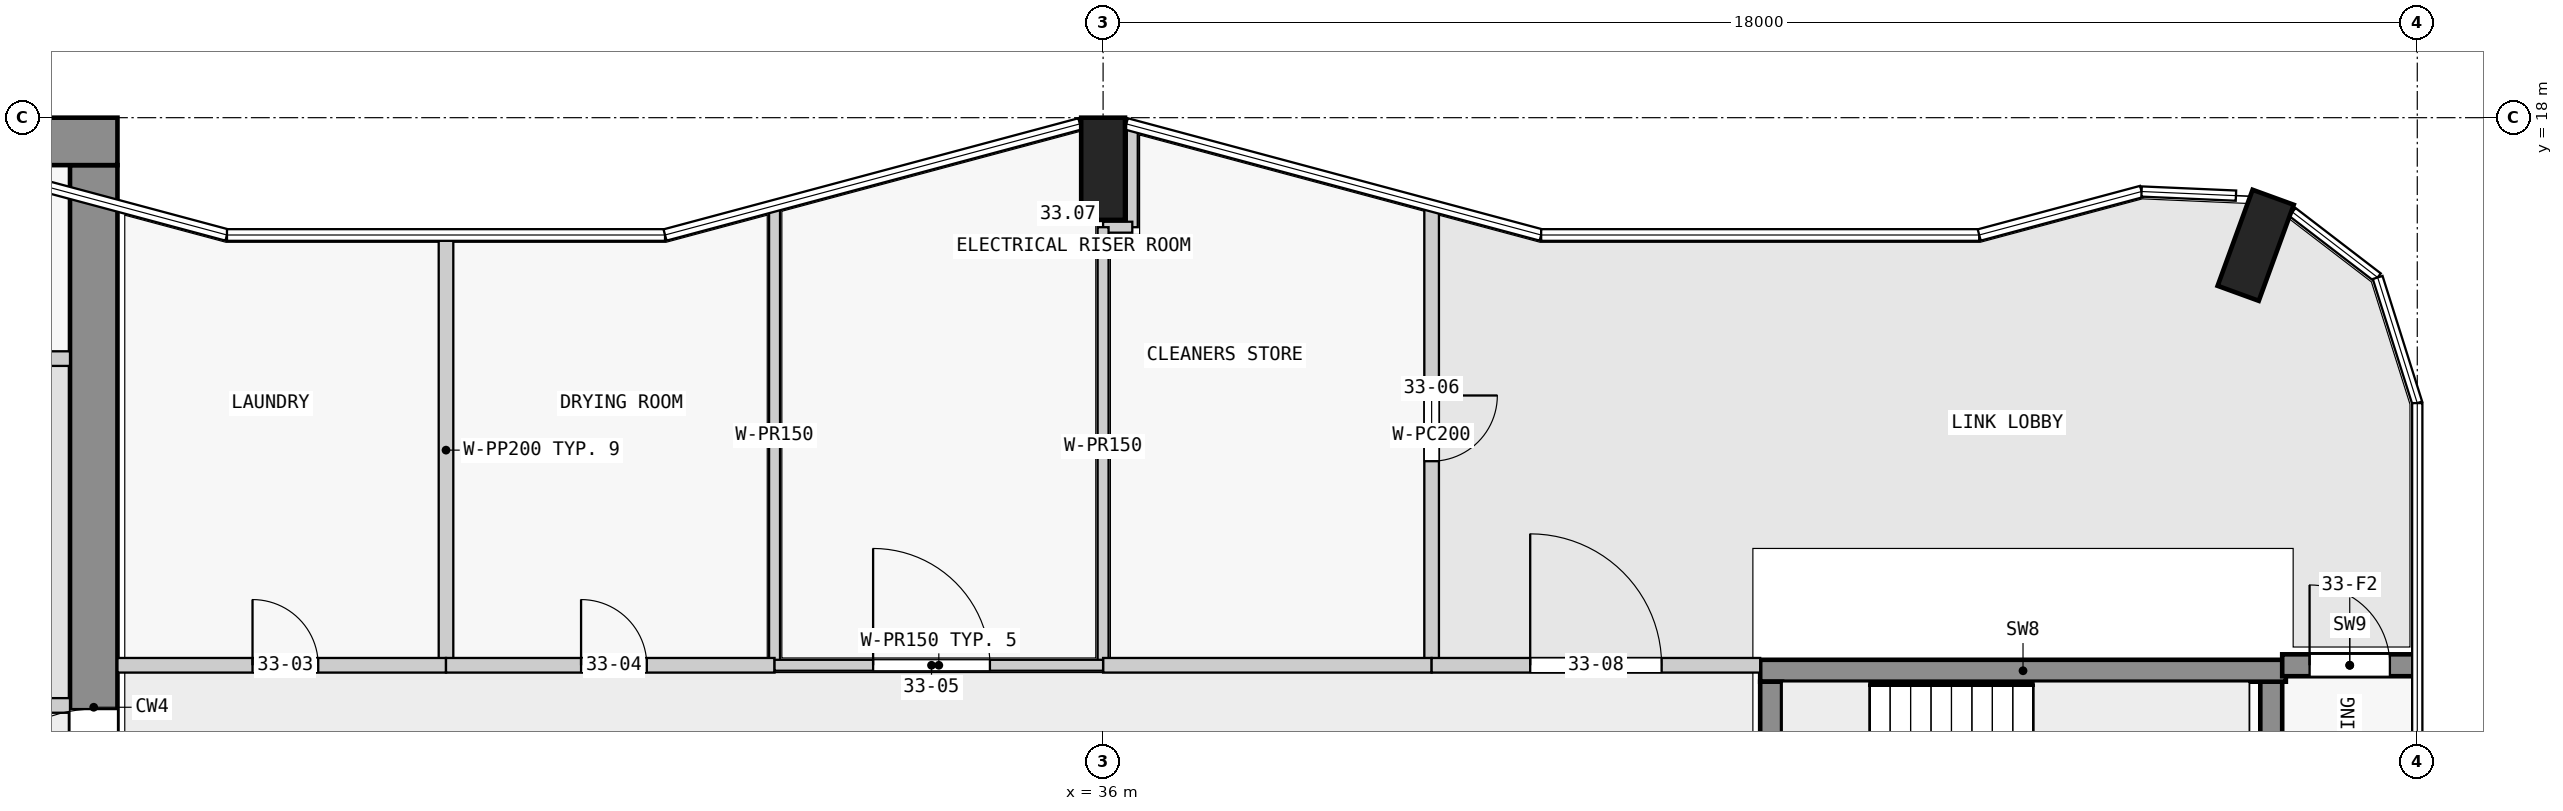
"""IFC4 building model, lengths in metres.
Left out: names, types, materials, properties, quantities, classifications, styles, units other than length and angle.
Written with IfcOpenShell. Run it as: python <this file> out.ifc"""

import sys

from ifc_helpers import new_model, si_unit, direction, frame, frame_2d, origin, origin_2d, place, context, subcontext, project, spatial, rectangle, extrude, element, fill, save


model = new_model("IFC4")
c1 = context("Model", 3, precision=1e-05, world=origin(), true_north=direction((0.0, 1.0)))
c2 = subcontext(c1, "Body", "Model", "MODEL_VIEW")
j1 = project(units=[si_unit("LENGTHUNIT", "METRE"), si_unit("PLANEANGLEUNIT", "RADIAN")], contexts=[c1])
p1 = place(None, origin())
s1 = spatial("IfcSite", under=j1, at=p1, CompositionType="ELEMENT")
p2 = place(p1, origin())
s2 = spatial("IfcBuilding", under=s1, at=p2, CompositionType="ELEMENT")
p3 = place(p2, frame((0.0, 0.0, 128.6)))
s3 = spatial("IfcBuildingStorey", under=s2, at=p3, CompositionType="ELEMENT", Elevation=128.6)
for number, where, z_axis, x_axis in (
    (1, (51.787, 16.252, 0.0), (0.0, 0.0, 1.0), (-0.94, 0.342, 0.0)),
    (2, (36.0, 17.3, 0.0), (0.0, 0.0, 1.0), (1.0, 0.0, 0.0)),
):
    element("IfcColumn", number, at=place(p3, frame(where, z_axis=z_axis, x_axis=x_axis)), inside=s3, PredefinedType="COLUMN", context=c2, shape_type="SweptSolid", body=[
        extrude(rectangle(XDim=0.6, YDim=1.4, at=origin_2d()), origin(), (0.0, 0.0, 1.0), 6.0),
    ])
p4 = place(p3, frame((1.65, 17.675, 0.0), z_axis=(0.0, 0.0, 1.0), x_axis=(1.0, 0.0, 0.0)))
e3 = element("IfcWall", 3, at=p4, inside=s3, PredefinedType="SHEAR", context=c2, shape_type="SweptSolid", body=[
    extrude(rectangle(XDim=20.85, YDim=0.65, at=frame_2d((10.425, 0.0))), origin(), (0.0, 0.0, 1.0), 5.7),
])
p5 = place(p3, frame((22.175, 2.5, 0.0), z_axis=(0.0, 0.0, 1.0), x_axis=(0.0, 1.0, 0.0)))
e4 = element("IfcWall", 4, at=p5, inside=s3, PredefinedType="SHEAR", context=c2, shape_type="SweptSolid", body=[
    extrude(rectangle(XDim=14.85, YDim=0.65, at=frame_2d((7.425, 0.0))), origin(), (0.0, 0.0, 1.0), 5.7),
])
p6 = place(p5, frame((5.6, 0.0, 0.0)))
e5 = element("IfcOpeningElement", 5, at=p6, cuts=e4, PredefinedType="OPENING", context=c2, shape_type="SweptSolid", body=[
    extrude(rectangle(XDim=1.8, YDim=2.1, at=frame_2d((0.9, 1.05))), frame((0.0, 0.335, 0.0), z_axis=(0.0, -1.0, 0.0), x_axis=(1.0, 0.0, 0.0)), (0.0, 0.0, 1.0), 0.67),
])
p7 = place(p3, frame((45.15, 7.725, 0.0), z_axis=(0.0, 0.0, 1.0), x_axis=(0.0, 1.0, 0.0)))
e6 = element("IfcWall", 6, at=p7, inside=s3, PredefinedType="SHEAR", context=c2, shape_type="SweptSolid", body=[
    extrude(rectangle(XDim=2.55, YDim=0.3, at=frame_2d((1.275, 0.0))), origin(), (0.0, 0.0, 1.0), 6.0),
])
p8 = place(p7, frame((0.725, 0.0, 0.0)))
e7 = element("IfcOpeningElement", 7, at=p8, cuts=e6, PredefinedType="OPENING", context=c2, shape_type="SweptSolid", body=[
    extrude(rectangle(XDim=1.1, YDim=2.1, at=frame_2d((0.55, 1.05))), frame((0.0, 0.16, 0.0), z_axis=(0.0, -1.0, 0.0), x_axis=(1.0, 0.0, 0.0)), (0.0, 0.0, 1.0), 0.32),
])
p9 = place(p3, frame((52.0, 7.725, 0.0), z_axis=(0.0, 0.0, 1.0), x_axis=(0.0, 1.0, 0.0)))
e8 = element("IfcWall", 8, at=p9, inside=s3, PredefinedType="SHEAR", context=c2, shape_type="SweptSolid", body=[
    extrude(rectangle(XDim=2.55, YDim=0.3, at=frame_2d((1.275, 0.0))), origin(), (0.0, 0.0, 1.0), 6.0),
])
p10 = place(p3, frame((45.0, 10.425, 0.0), z_axis=(0.0, 0.0, 1.0), x_axis=(1.0, 0.0, 0.0)))
e9 = element("IfcWall", 9, at=p10, inside=s3, PredefinedType="SHEAR", context=c2, shape_type="SweptSolid", body=[
    extrude(rectangle(XDim=7.2, YDim=0.3, at=frame_2d((3.6, 0.0))), origin(), (0.0, 0.0, 1.0), 6.0),
])
p11 = place(p3, frame((52.15, 10.5, 0.0), z_axis=(0.0, 0.0, 1.0), x_axis=(1.0, 0.0, 0.0)))
e10 = element("IfcWall", 10, at=p11, inside=s3, PredefinedType="SHEAR", context=c2, shape_type="SweptSolid", body=[
    extrude(rectangle(XDim=1.85, YDim=0.3, at=frame_2d((0.925, 0.0))), origin(), (0.0, 0.0, 1.0), 5.7),
])
p12 = place(p11, frame((0.375, 0.0, 0.0)))
e11 = element("IfcOpeningElement", 11, at=p12, cuts=e10, PredefinedType="OPENING", context=c2, shape_type="SweptSolid", body=[
    extrude(rectangle(XDim=1.1, YDim=2.1, at=frame_2d((0.55, 1.05))), frame((0.0, 0.16, 0.0), z_axis=(0.0, -1.0, 0.0), x_axis=(1.0, 0.0, 0.0)), (0.0, 0.0, 1.0), 0.32),
])
p13 = place(p3, frame((7.1, 9.95, 0.0), z_axis=(0.0, 0.0, 1.0), x_axis=(1.0, 0.0, 0.0)))
e12 = element("IfcWall", 12, at=p13, inside=s3, PredefinedType="PARTITIONING", context=c2, shape_type="SweptSolid", body=[
    extrude(rectangle(XDim=14.75, YDim=0.2, at=frame_2d((7.375, 0.0))), origin(), (0.0, 0.0, 1.0), 5.7),
])
p14 = place(p13, frame((6.35, 0.0, 0.0)))
e13 = element("IfcOpeningElement", 13, at=p14, cuts=e12, PredefinedType="OPENING", context=c2, shape_type="SweptSolid", body=[
    extrude(rectangle(XDim=1.1, YDim=2.1, at=frame_2d((0.55, 1.05))), frame((0.0, 0.11, 0.0), z_axis=(0.0, -1.0, 0.0), x_axis=(1.0, 0.0, 0.0)), (0.0, 0.0, 1.0), 0.22),
])
p15 = place(p3, frame((18.6, 14.7, 0.0), z_axis=(0.0, 0.0, 1.0), x_axis=(1.0, 0.0, 0.0)))
e14 = element("IfcWall", 14, at=p15, inside=s3, PredefinedType="PARTITIONING", context=c2, shape_type="SweptSolid", body=[
    extrude(rectangle(XDim=3.25, YDim=0.2, at=frame_2d((1.625, 0.0))), origin(), (0.0, 0.0, 1.0), 5.7),
])
p16 = place(p15, frame((0.3, 0.0, 0.0)))
e15 = element("IfcOpeningElement", 15, at=p16, cuts=e14, PredefinedType="OPENING", context=c2, shape_type="SweptSolid", body=[
    extrude(rectangle(XDim=0.9, YDim=2.1, at=frame_2d((0.45, 1.05))), frame((0.0, 0.11, 0.0), z_axis=(0.0, -1.0, 0.0), x_axis=(1.0, 0.0, 0.0)), (0.0, 0.0, 1.0), 0.22),
])
p17 = place(p15, frame((1.925, 0.0, 0.0)))
e16 = element("IfcOpeningElement", 16, at=p17, cuts=e14, PredefinedType="OPENING", context=c2, shape_type="SweptSolid", body=[
    extrude(rectangle(XDim=0.9, YDim=2.1, at=frame_2d((0.45, 1.05))), frame((0.0, 0.11, 0.0), z_axis=(0.0, -1.0, 0.0), x_axis=(1.0, 0.0, 0.0)), (0.0, 0.0, 1.0), 0.22),
])
p18 = place(p3, frame((36.4, 17.893, 0.0), z_axis=(0.0, 0.0, 1.0), x_axis=(0.0, -1.0, 0.0)))
e17 = element("IfcWall", 17, at=p18, inside=s3, PredefinedType="PARTITIONING", context=c2, shape_type="SweptSolid", body=[
    extrude(rectangle(XDim=1.393, YDim=0.15, at=frame_2d((0.697, 0.0))), origin(), (0.0, 0.0, 1.0), 5.7),
])
p19 = place(p3, frame((36.4, 16.5, 0.0), z_axis=(0.0, 0.0, 1.0), x_axis=(-1.0, 0.0, 0.0)))
e18 = element("IfcWall", 18, at=p19, inside=s3, PredefinedType="PARTITIONING", context=c2, shape_type="SweptSolid", body=[
    extrude(rectangle(XDim=0.4, YDim=0.15, at=frame_2d((0.2, 0.0))), origin(), (0.0, 0.0, 1.0), 5.7),
])
p20 = place(p3, frame((36.0, 16.5, 0.0), z_axis=(0.0, 0.0, 1.0), x_axis=(0.0, -1.0, 0.0)))
e19 = element("IfcWall", 19, at=p20, inside=s3, PredefinedType="PARTITIONING", context=c2, shape_type="SweptSolid", body=[
    extrude(rectangle(XDim=6.0, YDim=0.15, at=frame_2d((3.0, 0.0))), origin(), (0.0, 0.0, 1.0), 5.7),
])
p21 = place(p3, frame((40.5, 16.795, 0.0), z_axis=(0.0, 0.0, 1.0), x_axis=(0.0, -1.0, 0.0)))
e20 = element("IfcWall", 20, at=p21, inside=s3, PredefinedType="PARTITIONING", context=c2, shape_type="SweptSolid", body=[
    extrude(rectangle(XDim=6.295, YDim=0.2, at=frame_2d((3.147, 0.0))), origin(), (0.0, 0.0, 1.0), 5.7),
])
p22 = place(p21, frame((2.6, 0.0, 0.0)))
e21 = element("IfcOpeningElement", 21, at=p22, cuts=e20, PredefinedType="OPENING", context=c2, shape_type="SweptSolid", body=[
    extrude(rectangle(XDim=0.9, YDim=2.1, at=frame_2d((0.45, 1.05))), frame((0.0, 0.11, 0.0), z_axis=(0.0, -1.0, 0.0), x_axis=(1.0, 0.0, 0.0)), (0.0, 0.0, 1.0), 0.22),
])
p23 = place(p3, frame((31.5, 16.795, 0.0), z_axis=(0.0, 0.0, 1.0), x_axis=(0.0, -1.0, 0.0)))
e22 = element("IfcWall", 22, at=p23, inside=s3, PredefinedType="PARTITIONING", context=c2, shape_type="SweptSolid", body=[
    extrude(rectangle(XDim=6.295, YDim=0.15, at=frame_2d((3.147, 0.0))), origin(), (0.0, 0.0, 1.0), 5.7),
])
p24 = place(p3, frame((27.0, 16.393, 0.0), z_axis=(0.0, 0.0, 1.0), x_axis=(0.0, -1.0, 0.0)))
e23 = element("IfcWall", 23, at=p24, inside=s3, PredefinedType="PARTITIONING", context=c2, shape_type="SweptSolid", body=[
    extrude(rectangle(XDim=5.893, YDim=0.2, at=frame_2d((2.947, 0.0))), origin(), (0.0, 0.0, 1.0), 5.7),
])
p25 = place(p3, frame((36.0, 10.5, 0.0), z_axis=(0.0, 0.0, 1.0), x_axis=(1.0, 0.0, 0.0)))
e24 = element("IfcWall", 24, at=p25, inside=s3, PredefinedType="PARTITIONING", context=c2, shape_type="SweptSolid", body=[
    extrude(rectangle(XDim=4.5, YDim=0.2, at=frame_2d((2.25, 0.0))), origin(), (0.0, 0.0, 1.0), 5.7),
])
p26 = place(p3, frame((40.5, 10.5, 0.0), z_axis=(0.0, 0.0, 1.0), x_axis=(1.0, 0.0, 0.0)))
e25 = element("IfcWall", 25, at=p26, inside=s3, PredefinedType="PARTITIONING", context=c2, shape_type="SweptSolid", body=[
    extrude(rectangle(XDim=4.5, YDim=0.2, at=frame_2d((2.25, 0.0))), origin(), (0.0, 0.0, 1.0), 5.7),
])
p27 = place(p26, frame((1.35, 0.0, 0.0)))
e26 = element("IfcOpeningElement", 26, at=p27, cuts=e25, PredefinedType="OPENING", context=c2, shape_type="SweptSolid", body=[
    extrude(rectangle(XDim=1.8, YDim=2.1, at=frame_2d((0.9, 1.05))), frame((0.0, 0.11, 0.0), z_axis=(0.0, -1.0, 0.0), x_axis=(1.0, 0.0, 0.0)), (0.0, 0.0, 1.0), 0.22),
])
p28 = place(p3, frame((22.5, 10.5, 0.0), z_axis=(0.0, 0.0, 1.0), x_axis=(1.0, 0.0, 0.0)))
e27 = element("IfcWall", 27, at=p28, inside=s3, PredefinedType="PARTITIONING", context=c2, shape_type="SweptSolid", body=[
    extrude(rectangle(XDim=4.5, YDim=0.2, at=frame_2d((2.25, 0.0))), origin(), (0.0, 0.0, 1.0), 5.7),
])
p29 = place(p28, frame((1.85, 0.0, 0.0)))
e28 = element("IfcOpeningElement", 28, at=p29, cuts=e27, PredefinedType="OPENING", context=c2, shape_type="SweptSolid", body=[
    extrude(rectangle(XDim=0.9, YDim=2.1, at=frame_2d((0.45, 1.05))), frame((0.0, 0.11, 0.0), z_axis=(0.0, -1.0, 0.0), x_axis=(1.0, 0.0, 0.0)), (0.0, 0.0, 1.0), 0.22),
])
p30 = place(p3, frame((27.0, 10.5, 0.0), z_axis=(0.0, 0.0, 1.0), x_axis=(1.0, 0.0, 0.0)))
e29 = element("IfcWall", 29, at=p30, inside=s3, PredefinedType="PARTITIONING", context=c2, shape_type="SweptSolid", body=[
    extrude(rectangle(XDim=4.5, YDim=0.2, at=frame_2d((2.25, 0.0))), origin(), (0.0, 0.0, 1.0), 5.7),
])
p31 = place(p30, frame((1.85, 0.0, 0.0)))
e30 = element("IfcOpeningElement", 30, at=p31, cuts=e29, PredefinedType="OPENING", context=c2, shape_type="SweptSolid", body=[
    extrude(rectangle(XDim=0.9, YDim=2.1, at=frame_2d((0.45, 1.05))), frame((0.0, 0.11, 0.0), z_axis=(0.0, -1.0, 0.0), x_axis=(1.0, 0.0, 0.0)), (0.0, 0.0, 1.0), 0.22),
])
p32 = place(p3, frame((31.5, 10.5, 0.0), z_axis=(0.0, 0.0, 1.0), x_axis=(1.0, 0.0, 0.0)))
e31 = element("IfcWall", 31, at=p32, inside=s3, PredefinedType="PARTITIONING", context=c2, shape_type="SweptSolid", body=[
    extrude(rectangle(XDim=4.5, YDim=0.15, at=frame_2d((2.25, 0.0))), origin(), (0.0, 0.0, 1.0), 5.7),
])
p33 = place(p32, frame((1.35, 0.0, 0.0)))
e32 = element("IfcOpeningElement", 32, at=p33, cuts=e31, PredefinedType="OPENING", context=c2, shape_type="SweptSolid", body=[
    extrude(rectangle(XDim=1.6, YDim=2.4, at=frame_2d((0.8, 1.2))), frame((0.0, 0.085, 0.0), z_axis=(0.0, -1.0, 0.0), x_axis=(1.0, 0.0, 0.0)), (0.0, 0.0, 1.0), 0.17),
])
p34 = place(p6, origin())
e33 = element("IfcDoor", 33, at=p34, inside=s3, OperationType="DOUBLE_DOOR_SINGLE_SWING", PredefinedType="DOOR", context=c2, shape_type="SweptSolid", body=[
    extrude(rectangle(XDim=1.8, YDim=2.1, at=frame_2d((0.9, 1.05))), frame((0.0, 0.025, 0.0), z_axis=(0.0, -1.0, 0.0), x_axis=(1.0, 0.0, 0.0)), (0.0, 0.0, 1.0), 0.05),
])
fill(e5, e33)
p35 = place(p29, origin())
e34 = element("IfcDoor", 34, at=p35, inside=s3, OperationType="SINGLE_SWING_LEFT", PredefinedType="DOOR", context=c2, shape_type="SweptSolid", body=[
    extrude(rectangle(XDim=0.9, YDim=2.1, at=frame_2d((0.45, 1.05))), frame((0.0, 0.025, 0.0), z_axis=(0.0, -1.0, 0.0), x_axis=(1.0, 0.0, 0.0)), (0.0, 0.0, 1.0), 0.05),
])
fill(e28, e34)
p36 = place(p31, origin())
e35 = element("IfcDoor", 35, at=p36, inside=s3, OperationType="SINGLE_SWING_LEFT", PredefinedType="DOOR", context=c2, shape_type="SweptSolid", body=[
    extrude(rectangle(XDim=0.9, YDim=2.1, at=frame_2d((0.45, 1.05))), frame((0.0, 0.025, 0.0), z_axis=(0.0, -1.0, 0.0), x_axis=(1.0, 0.0, 0.0)), (0.0, 0.0, 1.0), 0.05),
])
fill(e30, e35)
p37 = place(p33, origin())
e36 = element("IfcDoor", 36, at=p37, inside=s3, OperationType="SINGLE_SWING_LEFT", PredefinedType="DOOR", context=c2, shape_type="SweptSolid", body=[
    extrude(rectangle(XDim=1.6, YDim=2.4, at=frame_2d((0.8, 1.2))), frame((0.0, 0.025, 0.0), z_axis=(0.0, -1.0, 0.0), x_axis=(1.0, 0.0, 0.0)), (0.0, 0.0, 1.0), 0.05),
])
fill(e32, e36)
p38 = place(p22, origin())
e37 = element("IfcDoor", 37, at=p38, inside=s3, OperationType="SINGLE_SWING_LEFT", PredefinedType="DOOR", context=c2, shape_type="SweptSolid", body=[
    extrude(rectangle(XDim=0.9, YDim=2.1, at=frame_2d((0.45, 1.05))), frame((0.0, 0.025, 0.0), z_axis=(0.0, -1.0, 0.0), x_axis=(1.0, 0.0, 0.0)), (0.0, 0.0, 1.0), 0.05),
])
fill(e21, e37)
p39 = place(p27, origin())
e38 = element("IfcDoor", 38, at=p39, inside=s3, OperationType="DOUBLE_DOOR_SINGLE_SWING", PredefinedType="DOOR", context=c2, shape_type="SweptSolid", body=[
    extrude(rectangle(XDim=1.8, YDim=2.1, at=frame_2d((0.9, 1.05))), frame((0.0, 0.025, 0.0), z_axis=(0.0, -1.0, 0.0), x_axis=(1.0, 0.0, 0.0)), (0.0, 0.0, 1.0), 0.05),
])
fill(e26, e38)
p40 = place(p12, origin())
e39 = element("IfcDoor", 39, at=p40, inside=s3, OperationType="SINGLE_SWING_LEFT", PredefinedType="DOOR", context=c2, shape_type="SweptSolid", body=[
    extrude(rectangle(XDim=1.1, YDim=2.1, at=frame_2d((0.55, 1.05))), frame((0.0, 0.025, 0.0), z_axis=(0.0, -1.0, 0.0), x_axis=(1.0, 0.0, 0.0)), (0.0, 0.0, 1.0), 0.05),
])
fill(e11, e39)
save(model, sys.argv[1])
